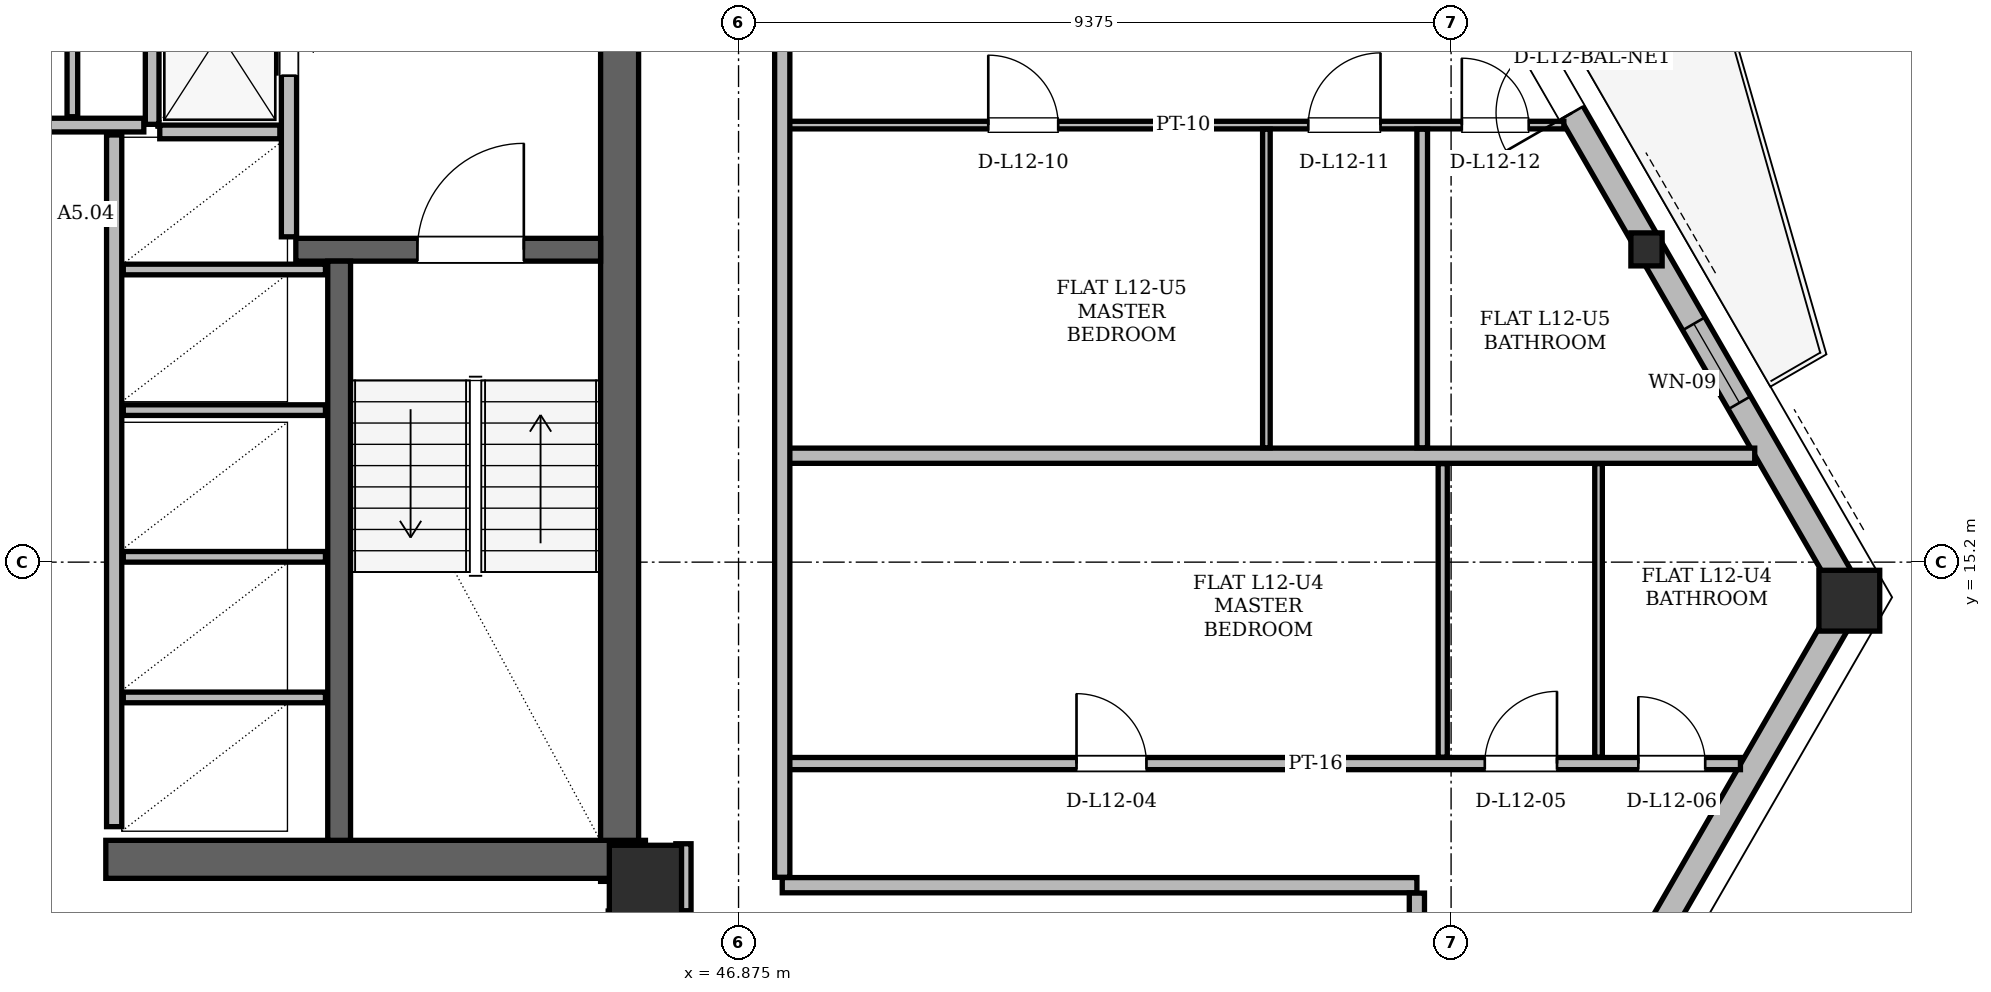
"""IFC4 building model, lengths in metres.
Left out: names, types, materials, properties, quantities, classifications, styles, units other than length and angle.
Written with IfcOpenShell. Run it as: python <this file> out.ifc"""

import sys

from ifc_helpers import new_model, si_unit, direction, frame, frame_2d, origin, origin_2d, place, context, subcontext, project, spatial, rectangle, hollow_rectangle, i_section, extrude, element, fill, save


model = new_model("IFC4")
c1 = context("Model", 3, precision=1e-05, world=origin(), true_north=direction((0.0, 1.0)))
c2 = subcontext(c1, "Body", "Model", "MODEL_VIEW")
j1 = project(units=[si_unit("LENGTHUNIT", "METRE"), si_unit("PLANEANGLEUNIT", "RADIAN")], contexts=[c1])
p1 = place(None, origin())
s1 = spatial("IfcSite", under=j1, at=p1, CompositionType="ELEMENT")
p2 = place(p1, origin())
s2 = spatial("IfcBuilding", under=s1, at=p2, CompositionType="ELEMENT")
p3 = place(p2, frame((0.0, 0.0, 48.9)))
s3 = spatial("IfcBuildingStorey", under=s2, at=p3, CompositionType="ELEMENT", Elevation=48.9)
p4 = place(p3, frame((45.65, 11.0, 0.0), z_axis=(0.0, 0.0, 1.0), x_axis=(1.0, 0.0, 0.0)))
e1 = element("IfcColumn", 1, at=p4, inside=s3, PredefinedType="COLUMN", context=c2, shape_type="SweptSolid", body=[
    extrude(hollow_rectangle(XDim=0.95, YDim=0.95, WallThickness=0.08, at=origin_2d()), origin(), (0.0, 0.0, 1.0), 3.6),
])
p5 = place(p3, frame((61.521, 14.738, 0.005), z_axis=(-0.01746413659, -0.025074966543, 0.999533015956), x_axis=(0.820587791901, -0.57152049463, 0.0)))
e2 = element("IfcColumn", 2, at=p5, inside=s3, PredefinedType="COLUMN", context=c2, shape_type="SweptSolid", body=[
    extrude(hollow_rectangle(XDim=0.8, YDim=0.8, WallThickness=0.065, at=origin_2d()), origin(), (0.0, 0.0, 1.0), 3.593),
])
p6 = place(p3, frame((58.856, 19.353, 0.005), z_axis=(-0.019503623219, -0.021542329479, 0.999577679184), x_axis=(0.741314132302, -0.671158220727, 0.0)))
e3 = element("IfcColumn", 3, at=p6, inside=s3, PredefinedType="COLUMN", context=c2, shape_type="SweptSolid", body=[
    extrude(i_section(OverallWidth=0.411, OverallDepth=0.434, WebThickness=0.036, FlangeThickness=0.057, at=origin_2d()), origin(), (0.0, 0.0, 1.0), 3.593),
])
p7 = place(p3, frame((45.31, 11.0, 0.0), z_axis=(0.0, 0.0, 1.0), x_axis=(0.0, 1.0, 0.0)))
e4 = element("IfcWall", 4, at=p7, inside=s3, PredefinedType="SHEAR", context=c2, shape_type="SweptSolid", body=[
    extrude(rectangle(XDim=13.3, YDim=0.5, at=frame_2d((6.65, 0.0))), origin(), (0.0, 0.0, 1.0), 3.36),
])
p8 = place(p3, frame((38.55, 11.29, 0.0), z_axis=(0.0, 0.0, 1.0), x_axis=(1.0, 0.0, 0.0)))
e5 = element("IfcWall", 5, at=p8, inside=s3, PredefinedType="SHEAR", context=c2, shape_type="SweptSolid", body=[
    extrude(rectangle(XDim=7.1, YDim=0.5, at=frame_2d((3.55, 0.0))), origin(), (0.0, 0.0, 1.0), 3.36),
])
p9 = place(p3, frame((41.05, 19.31, 0.0), z_axis=(0.0, 0.0, 1.0), x_axis=(1.0, 0.0, 0.0)))
e6 = element("IfcWall", 6, at=p9, inside=s3, PredefinedType="SHEAR", context=c2, shape_type="SweptSolid", body=[
    extrude(rectangle(XDim=4.01, YDim=0.3, at=frame_2d((2.005, 0.0))), origin(), (0.0, 0.0, 1.0), 3.36),
])
p10 = place(p9, frame((1.6, 0.0, 0.0)))
e7 = element("IfcOpeningElement", 7, at=p10, cuts=e6, PredefinedType="OPENING", context=c2, shape_type="SweptSolid", body=[
    extrude(rectangle(XDim=1.4, YDim=2.2, at=frame_2d((0.7, 1.1))), frame((0.0, 0.15, 0.0), z_axis=(0.0, -1.0, 0.0), x_axis=(1.0, 0.0, 0.0)), (0.0, 0.0, 1.0), 0.3),
])
p11 = place(p3, frame((41.62, 11.54, 0.0), z_axis=(0.0, 0.0, 1.0), x_axis=(0.0, 1.0, 0.0)))
e8 = element("IfcWall", 8, at=p11, inside=s3, PredefinedType="SHEAR", context=c2, shape_type="SweptSolid", body=[
    extrude(rectangle(XDim=7.62, YDim=0.3, at=frame_2d((3.81, 0.0))), origin(), (0.0, 0.0, 1.0), 3.36),
])
p12 = place(p3, frame((54.154, 1.978, 0.0), z_axis=(0.0, 0.0, 1.0), x_axis=(0.499999290135, 0.866025813625, 0.0)))
e9 = element("IfcWall", 9, at=p12, inside=s3, PredefinedType="SOLIDWALL", context=c2, shape_type="SweptSolid", body=[
    extrude(rectangle(XDim=14.733, YDim=0.34, at=frame_2d((7.367, 0.0))), origin(), (0.0, 0.0, 1.0), 2.494),
])
p13 = place(p3, frame((61.521, 14.738, 0.0), z_axis=(0.0, 0.0, 1.0), x_axis=(-0.499992652499, 0.866029645824, 0.0)))
e10 = element("IfcWall", 10, at=p13, inside=s3, PredefinedType="SOLIDWALL", context=c2, shape_type="SweptSolid", body=[
    extrude(rectangle(XDim=14.704, YDim=0.34, at=frame_2d((7.352, 0.0))), origin(), (0.0, 0.0, 1.0), 2.494),
])
p14 = place(p13, frame((7.359, 0.0, 0.0)))
e11 = element("IfcOpeningElement", 11, at=p14, cuts=e10, PredefinedType="OPENING", context=c2, shape_type="SweptSolid", body=[
    extrude(rectangle(XDim=1.0, YDim=2.18, at=frame_2d((0.5, 1.09))), frame((0.0, 0.17, 0.0), z_axis=(0.0, -1.0, 0.0), x_axis=(1.0, 0.0, 0.0)), (0.0, 0.0, 1.0), 0.34),
])
p15 = place(p13, frame((11.015, 0.0, 0.85)))
e12 = element("IfcOpeningElement", 12, at=p15, cuts=e10, PredefinedType="OPENING", context=c2, shape_type="SweptSolid", body=[
    extrude(rectangle(XDim=3.0, YDim=1.534, at=frame_2d((1.5, 0.767))), frame((0.0, 0.17, 0.0), z_axis=(0.0, -1.0, 0.0), x_axis=(1.0, 0.0, 0.0)), (0.0, 0.0, 1.0), 0.34),
])
p16 = place(p13, frame((2.955, 0.0, 0.85)))
e13 = element("IfcOpeningElement", 13, at=p16, cuts=e10, PredefinedType="OPENING", context=c2, shape_type="SweptSolid", body=[
    extrude(rectangle(XDim=1.2, YDim=1.48, at=frame_2d((0.6, 0.74))), frame((0.0, 0.17, 0.0), z_axis=(0.0, -1.0, 0.0), x_axis=(1.0, 0.0, 0.0)), (0.0, 0.0, 1.0), 0.34),
])
p17 = place(p3, frame((40.96, 19.48, 0.0), z_axis=(0.0, 0.0, 1.0), x_axis=(0.0, 1.0, 0.0)))
e14 = element("IfcWall", 14, at=p17, inside=s3, PredefinedType="PARTITIONING", context=c2, shape_type="SweptSolid", body=[
    extrude(rectangle(XDim=4.5, YDim=0.2, at=frame_2d((2.25, 0.0))), origin(), (0.0, 0.0, 1.0), 2.4),
])
p18 = place(p17, frame((2.12, 0.0, 0.0)))
e15 = element("IfcOpeningElement", 15, at=p18, cuts=e14, PredefinedType="OPENING", context=c2, shape_type="SweptSolid", body=[
    extrude(rectangle(XDim=1.1, YDim=2.2, at=frame_2d((0.55, 1.1))), frame((0.0, 0.1, 0.0), z_axis=(0.0, -1.0, 0.0), x_axis=(1.0, 0.0, 0.0)), (0.0, 0.0, 1.0), 0.2),
])
p19 = place(p3, frame((39.16, 20.96, 0.0), z_axis=(0.0, 0.0, 1.0), x_axis=(0.0, 1.0, 0.0)))
e16 = element("IfcWall", 16, at=p19, inside=s3, PredefinedType="PARTITIONING", context=c2, shape_type="SweptSolid", body=[
    extrude(rectangle(XDim=3.02, YDim=0.18, at=frame_2d((1.51, 0.0))), origin(), (0.0, 0.0, 1.0), 2.4),
])
p20 = place(p3, frame((39.26, 20.86, 0.0), z_axis=(0.0, 0.0, 1.0), x_axis=(1.0, 0.0, 0.0)))
e17 = element("IfcWall", 17, at=p20, inside=s3, PredefinedType="PARTITIONING", context=c2, shape_type="SweptSolid", body=[
    extrude(rectangle(XDim=1.58, YDim=0.18, at=frame_2d((0.79, 0.0))), origin(), (0.0, 0.0, 1.0), 3.36),
])
p21 = place(p3, frame((38.66, 11.72, 0.0), z_axis=(0.0, 0.0, 1.0), x_axis=(0.0, 1.0, 0.0)))
e18 = element("IfcWall", 18, at=p21, inside=s3, PredefinedType="PARTITIONING", context=c2, shape_type="SweptSolid", body=[
    extrude(rectangle(XDim=9.1, YDim=0.2, at=frame_2d((4.55, 0.0))), origin(), (0.0, 0.0, 1.0), 3.36),
])
for number, where, z_axis, x_axis in (
    (19, (38.78, 13.42, 0.0), (0.0, 0.0, 1.0), (1.0, 0.0, 0.0)),
    (20, (38.78, 15.27, 0.0), (0.0, 0.0, 1.0), (1.0, 0.0, 0.0)),
    (21, (38.78, 17.2, 0.0), (0.0, 0.0, 1.0), (1.0, 0.0, 0.0)),
    (22, (38.78, 19.05, 0.0), (0.0, 0.0, 1.0), (1.0, 0.0, 0.0)),
):
    element("IfcWall", number, at=place(p3, frame(where, z_axis=z_axis, x_axis=x_axis)), inside=s3, PredefinedType="PARTITIONING", context=c2, shape_type="SweptSolid", body=[
        extrude(rectangle(XDim=2.66, YDim=0.14, at=frame_2d((1.33, 0.0))), origin(), (0.0, 0.0, 1.0), 3.36),
    ])
p22 = place(p3, frame((35.95, 20.95, 0.0), z_axis=(0.0, 0.0, 1.0), x_axis=(1.0, 0.0, 0.0)))
e23 = element("IfcWall", 23, at=p22, inside=s3, PredefinedType="PARTITIONING", context=c2, shape_type="SweptSolid", body=[
    extrude(rectangle(XDim=3.1, YDim=0.18, at=frame_2d((1.55, 0.0))), origin(), (0.0, 0.0, 1.0), 3.36),
])
p23 = place(p3, frame((38.11, 21.06, 0.0), z_axis=(0.0, 0.0, 1.0), x_axis=(0.0, 1.0, 0.0)))
e24 = element("IfcWall", 24, at=p23, inside=s3, PredefinedType="PARTITIONING", context=c2, shape_type="SweptSolid", body=[
    extrude(rectangle(XDim=2.92, YDim=0.14, at=frame_2d((1.46, 0.0))), origin(), (0.0, 0.0, 1.0), 2.4),
])
p24 = place(p3, frame((45.16, 10.51, 0.0), z_axis=(0.0, 0.0, 1.0), x_axis=(1.0, 0.0, 0.0)))
e25 = element("IfcWall", 25, at=p24, inside=s3, PredefinedType="PARTITIONING", context=c2, shape_type="SweptSolid", body=[
    extrude(rectangle(XDim=0.98, YDim=0.2, at=frame_2d((0.49, 0.0))), origin(), (0.0, 0.0, 1.0), 2.738),
])
p25 = place(p3, frame((47.45, 10.95, 0.0), z_axis=(0.0, 0.0, 1.0), x_axis=(1.0, 0.0, 0.0)))
e26 = element("IfcWall", 26, at=p25, inside=s3, PredefinedType="PARTITIONING", context=c2, shape_type="SweptSolid", body=[
    extrude(rectangle(XDim=8.35, YDim=0.2, at=frame_2d((4.175, 0.0))), origin(), (0.0, 0.0, 1.0), 3.36),
])
p26 = place(p3, frame((47.4, 12.55, 0.0), z_axis=(0.0, 0.0, 1.0), x_axis=(1.0, 0.0, 0.0)))
e27 = element("IfcWall", 27, at=p26, inside=s3, PredefinedType="PARTITIONING", context=c2, shape_type="SweptSolid", body=[
    extrude(rectangle(XDim=12.657, YDim=0.16, at=frame_2d((6.329, 0.0))), origin(), (0.0, 0.0, 1.0), 2.738),
])
p27 = place(p26, frame((3.922, 0.0, 0.0)))
e28 = element("IfcOpeningElement", 28, at=p27, cuts=e27, PredefinedType="OPENING", context=c2, shape_type="SweptSolid", body=[
    extrude(rectangle(XDim=0.92, YDim=2.12, at=frame_2d((0.46, 1.06))), frame((0.0, 0.08, 0.0), z_axis=(0.0, -1.0, 0.0), x_axis=(1.0, 0.0, 0.0)), (0.0, 0.0, 1.0), 0.16),
])
p28 = place(p26, frame((9.293, 0.0, 0.0)))
e29 = element("IfcOpeningElement", 29, at=p28, cuts=e27, PredefinedType="OPENING", context=c2, shape_type="SweptSolid", body=[
    extrude(rectangle(XDim=0.95, YDim=2.1, at=frame_2d((0.475, 1.05))), frame((0.0, 0.08, 0.0), z_axis=(0.0, -1.0, 0.0), x_axis=(1.0, 0.0, 0.0)), (0.0, 0.0, 1.0), 0.16),
])
p29 = place(p26, frame((11.313, 0.0, 0.0)))
e30 = element("IfcOpeningElement", 30, at=p29, cuts=e27, PredefinedType="OPENING", context=c2, shape_type="SweptSolid", body=[
    extrude(rectangle(XDim=0.88, YDim=2.08, at=frame_2d((0.44, 1.04))), frame((0.0, 0.08, 0.0), z_axis=(0.0, -1.0, 0.0), x_axis=(1.0, 0.0, 0.0)), (0.0, 0.0, 1.0), 0.16),
])
p30 = place(p3, frame((47.45, 16.6, 0.0), z_axis=(0.0, 0.0, 1.0), x_axis=(1.0, 0.0, 0.0)))
e31 = element("IfcWall", 31, at=p30, inside=s3, PredefinedType="PARTITIONING", context=c2, shape_type="SweptSolid", body=[
    extrude(rectangle(XDim=12.795, YDim=0.2, at=frame_2d((6.397, 0.0))), origin(), (0.0, 0.0, 1.0), 2.494),
])
p31 = place(p3, frame((47.4, 20.95, 0.0), z_axis=(0.0, 0.0, 1.0), x_axis=(1.0, 0.0, 0.0)))
e32 = element("IfcWall", 32, at=p31, inside=s3, PredefinedType="PARTITIONING", context=c2, shape_type="SweptSolid", body=[
    extrude(rectangle(XDim=10.333, YDim=0.1, at=frame_2d((5.167, 0.0))), origin(), (0.0, 0.0, 1.0), 3.36),
])
p32 = place(p31, frame((2.76, 0.0, 0.0)))
e33 = element("IfcOpeningElement", 33, at=p32, cuts=e32, PredefinedType="OPENING", context=c2, shape_type="SweptSolid", body=[
    extrude(rectangle(XDim=0.92, YDim=2.12, at=frame_2d((0.46, 1.06))), frame((0.0, 0.05, 0.0), z_axis=(0.0, -1.0, 0.0), x_axis=(1.0, 0.0, 0.0)), (0.0, 0.0, 1.0), 0.1),
])
p33 = place(p31, frame((6.971, 0.0, 0.0)))
e34 = element("IfcOpeningElement", 34, at=p33, cuts=e32, PredefinedType="OPENING", context=c2, shape_type="SweptSolid", body=[
    extrude(rectangle(XDim=0.95, YDim=2.1, at=frame_2d((0.475, 1.05))), frame((0.0, 0.05, 0.0), z_axis=(0.0, -1.0, 0.0), x_axis=(1.0, 0.0, 0.0)), (0.0, 0.0, 1.0), 0.1),
])
p34 = place(p31, frame((8.991, 0.0, 0.0)))
e35 = element("IfcOpeningElement", 35, at=p34, cuts=e32, PredefinedType="OPENING", context=c2, shape_type="SweptSolid", body=[
    extrude(rectangle(XDim=0.88, YDim=2.08, at=frame_2d((0.44, 1.04))), frame((0.0, 0.05, 0.0), z_axis=(0.0, -1.0, 0.0), x_axis=(1.0, 0.0, 0.0)), (0.0, 0.0, 1.0), 0.1),
])
p35 = place(p3, frame((46.15, 10.614, 0.0), z_axis=(0.0, 0.0, 1.0), x_axis=(0.0, 1.0, 0.0)))
e36 = element("IfcWall", 36, at=p35, inside=s3, PredefinedType="PARTITIONING", context=c2, shape_type="SweptSolid", body=[
    extrude(rectangle(XDim=0.881, YDim=0.2, at=frame_2d((0.44, 0.0))), origin(), (0.0, 0.0, 1.0), 2.738),
])
p36 = place(p3, frame((47.45, 11.054, 0.0), z_axis=(0.0, 0.0, 1.0), x_axis=(0.0, 1.0, 0.0)))
e37 = element("IfcWall", 37, at=p36, inside=s3, PredefinedType="PARTITIONING", context=c2, shape_type="SweptSolid", body=[
    extrude(rectangle(XDim=27.683, YDim=0.2, at=frame_2d((13.841, 0.0))), origin(), (0.0, 0.0, 1.0), 2.494),
])
p37 = place(p36, frame((10.989, 0.0, 0.0)))
e38 = element("IfcOpeningElement", 38, at=p37, cuts=e37, PredefinedType="OPENING", context=c2, shape_type="SweptSolid", body=[
    extrude(rectangle(XDim=1.0, YDim=2.18, at=frame_2d((0.5, 1.09))), frame((0.0, 0.1, 0.0), z_axis=(0.0, -1.0, 0.0), x_axis=(1.0, 0.0, 0.0)), (0.0, 0.0, 1.0), 0.2),
])
p38 = place(p3, frame((53.82, 16.704, 0.0), z_axis=(0.0, 0.0, 1.0), x_axis=(0.0, 1.0, 0.0)))
e39 = element("IfcWall", 39, at=p38, inside=s3, PredefinedType="PARTITIONING", context=c2, shape_type="SweptSolid", body=[
    extrude(rectangle(XDim=4.192, YDim=0.1, at=frame_2d((2.096, 0.0))), origin(), (0.0, 0.0, 1.0), 3.36),
])
p39 = place(p3, frame((55.8, 9.404, 0.0), z_axis=(0.0, 0.0, 1.0), x_axis=(0.0, 1.0, 0.0)))
e40 = element("IfcWall", 40, at=p39, inside=s3, PredefinedType="PARTITIONING", context=c2, shape_type="SweptSolid", body=[
    extrude(rectangle(XDim=1.442, YDim=0.2, at=frame_2d((0.721, 0.0))), origin(), (0.0, 0.0, 1.0), 3.36),
])
p40 = place(p3, frame((55.87, 16.704, 0.0), z_axis=(0.0, 0.0, 1.0), x_axis=(0.0, 1.0, 0.0)))
e41 = element("IfcWall", 41, at=p40, inside=s3, PredefinedType="PARTITIONING", context=c2, shape_type="SweptSolid", body=[
    extrude(rectangle(XDim=4.192, YDim=0.14, at=frame_2d((2.096, 0.0))), origin(), (0.0, 0.0, 1.0), 2.946),
])
p41 = place(p3, frame((56.14, 12.634, 0.0), z_axis=(0.0, 0.0, 1.0), x_axis=(0.0, 1.0, 0.0)))
e42 = element("IfcWall", 42, at=p41, inside=s3, PredefinedType="PARTITIONING", context=c2, shape_type="SweptSolid", body=[
    extrude(rectangle(XDim=3.862, YDim=0.12, at=frame_2d((1.931, 0.0))), origin(), (0.0, 0.0, 1.0), 2.738),
])
p42 = place(p3, frame((58.19, 12.634, 0.0), z_axis=(0.0, 0.0, 1.0), x_axis=(0.0, 1.0, 0.0)))
e43 = element("IfcWall", 43, at=p42, inside=s3, PredefinedType="PARTITIONING", context=c2, shape_type="SweptSolid", body=[
    extrude(rectangle(XDim=3.862, YDim=0.1, at=frame_2d((1.931, 0.0))), origin(), (0.0, 0.0, 1.0), 2.738),
])
p43 = place(p14, origin())
e44 = element("IfcDoor", 44, at=p43, inside=s3, OperationType="SINGLE_SWING_LEFT", PredefinedType="DOOR", context=c2, shape_type="SweptSolid", body=[
    extrude(rectangle(XDim=1.0, YDim=2.18, at=frame_2d((0.5, 1.09))), frame((0.0, 0.025, 0.0), z_axis=(0.0, -1.0, 0.0), x_axis=(1.0, 0.0, 0.0)), (0.0, 0.0, 1.0), 0.05),
])
fill(e11, e44)
p44 = place(p16, origin())
e45 = element("IfcWindow", 45, at=p44, inside=s3, PartitioningType="SINGLE_PANEL", PredefinedType="WINDOW", context=c2, shape_type="SweptSolid", body=[
    extrude(rectangle(XDim=1.2, YDim=1.48, at=frame_2d((0.6, 0.74))), frame((0.0, 0.03, 0.0), z_axis=(0.0, -1.0, 0.0), x_axis=(1.0, 0.0, 0.0)), (0.0, 0.0, 1.0), 0.06),
])
fill(e13, e45)
p45 = place(p18, origin())
e46 = element("IfcDoor", 46, at=p45, inside=s3, OperationType="SLIDING_TO_RIGHT", PredefinedType="DOOR", context=c2, shape_type="SweptSolid", body=[
    extrude(rectangle(XDim=1.1, YDim=2.2, at=frame_2d((0.55, 1.1))), frame((0.0, 0.025, 0.0), z_axis=(0.0, -1.0, 0.0), x_axis=(1.0, 0.0, 0.0)), (0.0, 0.0, 1.0), 0.05),
])
fill(e15, e46)
p46 = place(p10, origin())
e47 = element("IfcDoor", 47, at=p46, inside=s3, OperationType="SINGLE_SWING_RIGHT", PredefinedType="DOOR", context=c2, shape_type="SweptSolid", body=[
    extrude(rectangle(XDim=1.4, YDim=2.2, at=frame_2d((0.7, 1.1))), frame((0.0, 0.025, 0.0), z_axis=(0.0, -1.0, 0.0), x_axis=(1.0, 0.0, 0.0)), (0.0, 0.0, 1.0), 0.05),
])
fill(e7, e47)
p47 = place(p27, origin())
e48 = element("IfcDoor", 48, at=p47, inside=s3, OperationType="SINGLE_SWING_LEFT", PredefinedType="DOOR", context=c2, shape_type="SweptSolid", body=[
    extrude(rectangle(XDim=0.92, YDim=2.12, at=frame_2d((0.46, 1.06))), frame((0.0, 0.025, 0.0), z_axis=(0.0, -1.0, 0.0), x_axis=(1.0, 0.0, 0.0)), (0.0, 0.0, 1.0), 0.05),
])
fill(e28, e48)
p48 = place(p28, origin())
e49 = element("IfcDoor", 49, at=p48, inside=s3, OperationType="SINGLE_SWING_RIGHT", PredefinedType="DOOR", context=c2, shape_type="SweptSolid", body=[
    extrude(rectangle(XDim=0.95, YDim=2.1, at=frame_2d((0.475, 1.05))), frame((0.0, 0.025, 0.0), z_axis=(0.0, -1.0, 0.0), x_axis=(1.0, 0.0, 0.0)), (0.0, 0.0, 1.0), 0.05),
])
fill(e29, e49)
p49 = place(p29, origin())
e50 = element("IfcDoor", 50, at=p49, inside=s3, OperationType="SINGLE_SWING_LEFT", PredefinedType="DOOR", context=c2, shape_type="SweptSolid", body=[
    extrude(rectangle(XDim=0.88, YDim=2.08, at=frame_2d((0.44, 1.04))), frame((0.0, 0.025, 0.0), z_axis=(0.0, -1.0, 0.0), x_axis=(1.0, 0.0, 0.0)), (0.0, 0.0, 1.0), 0.05),
])
fill(e30, e50)
p50 = place(p32, origin())
e51 = element("IfcDoor", 51, at=p50, inside=s3, OperationType="SINGLE_SWING_LEFT", PredefinedType="DOOR", context=c2, shape_type="SweptSolid", body=[
    extrude(rectangle(XDim=0.92, YDim=2.12, at=frame_2d((0.46, 1.06))), frame((0.0, 0.025, 0.0), z_axis=(0.0, -1.0, 0.0), x_axis=(1.0, 0.0, 0.0)), (0.0, 0.0, 1.0), 0.05),
])
fill(e33, e51)
p51 = place(p33, origin())
e52 = element("IfcDoor", 52, at=p51, inside=s3, OperationType="SINGLE_SWING_RIGHT", PredefinedType="DOOR", context=c2, shape_type="SweptSolid", body=[
    extrude(rectangle(XDim=0.95, YDim=2.1, at=frame_2d((0.475, 1.05))), frame((0.0, 0.025, 0.0), z_axis=(0.0, -1.0, 0.0), x_axis=(1.0, 0.0, 0.0)), (0.0, 0.0, 1.0), 0.05),
])
fill(e34, e52)
p52 = place(p34, origin())
e53 = element("IfcDoor", 53, at=p52, inside=s3, OperationType="SINGLE_SWING_LEFT", PredefinedType="DOOR", context=c2, shape_type="SweptSolid", body=[
    extrude(rectangle(XDim=0.88, YDim=2.08, at=frame_2d((0.44, 1.04))), frame((0.0, 0.025, 0.0), z_axis=(0.0, -1.0, 0.0), x_axis=(1.0, 0.0, 0.0)), (0.0, 0.0, 1.0), 0.05),
])
fill(e35, e53)
save(model, sys.argv[1])
